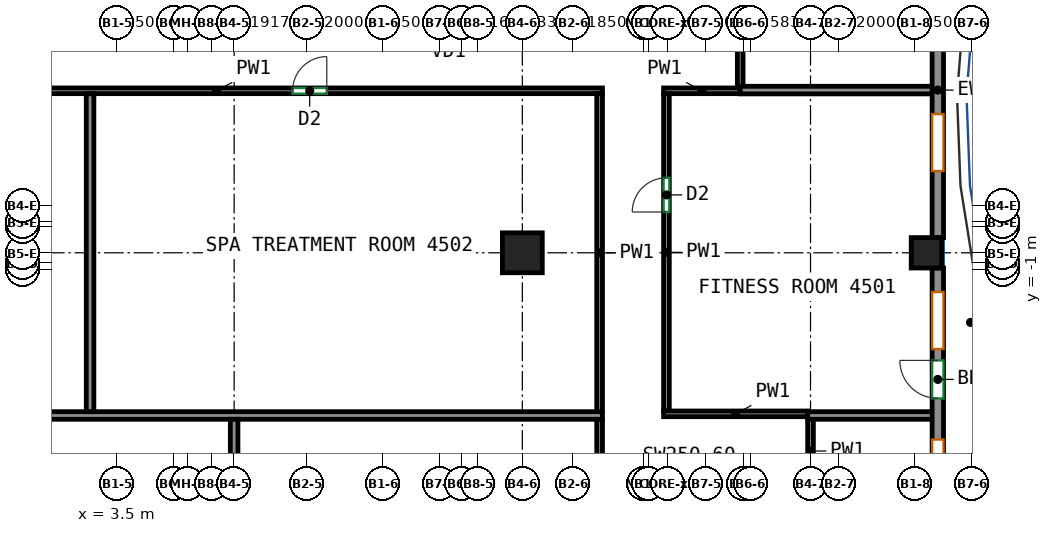
"""IFC4 building model, lengths in metres.
Left out: names, types, materials, properties, quantities, classifications, styles, units other than length and angle.
Written with IfcOpenShell. Run it as: python <this file> out.ifc"""

import sys

from ifc_helpers import new_model, si_unit, direction, frame, frame_2d, origin, origin_2d, place, context, subcontext, project, spatial, rectangle, extrude, source, transform, mapped, element, fill, save


model = new_model("IFC4")
c1 = context("Model", 3, precision=1e-05, world=origin(), true_north=direction((0.0, 1.0)))
c2 = subcontext(c1, "Body", "Model", "MODEL_VIEW")
j1 = project(units=[si_unit("LENGTHUNIT", "METRE"), si_unit("PLANEANGLEUNIT", "RADIAN")], contexts=[c1])
p1 = place(None, origin())
s1 = spatial("IfcSite", under=j1, at=p1, CompositionType="ELEMENT")
p2 = place(p1, origin())
s2 = spatial("IfcBuilding", under=s1, at=p2, CompositionType="ELEMENT")
p3 = place(p2, frame((0.0, 0.0, 188.9)))
s3 = spatial("IfcBuildingStorey", under=s2, at=p3, CompositionType="ELEMENT", Elevation=188.9)
m1 = source(origin(), c2, "Body", "SweptSolid", [
    extrude(rectangle(XDim=1.05, YDim=1.05, at=origin_2d()), origin(), (0.0, 0.0, 1.0), 3.12),
])
p4 = place(p3, frame((14.167, -0.562, 0.0), z_axis=(0.0, 0.0, 1.0), x_axis=(1.0, 0.0, 0.0)))
e1 = element("IfcColumn", 1, at=p4, inside=s3, PredefinedType="COLUMN", context=c2, shape_type="MappedRepresentation", body=[
    mapped(m1, transform((0.0, 0.0, 0.0))),
])
m2 = source(origin(), c2, "Body", "SweptSolid", [
    extrude(rectangle(XDim=0.8, YDim=0.8, at=origin_2d()), origin(), (0.0, 0.0, 1.0), 3.12),
])
p5 = place(p3, frame((24.8, -0.562, 0.0), z_axis=(0.0, 0.0, 1.0), x_axis=(1.0, 0.0, 0.0)))
e2 = element("IfcColumn", 2, at=p5, inside=s3, PredefinedType="COLUMN", context=c2, shape_type="MappedRepresentation", body=[
    mapped(m2, transform((0.0, 0.0, 0.0))),
])
m3 = source(origin(), c2, "Body", "SweptSolid", [
    extrude(rectangle(XDim=7.763, YDim=0.3, at=frame_2d((3.881, 0.0))), origin(), (0.0, 0.0, 1.0), 3.12),
])
p6 = place(p3, frame((25.1, -8.725, 0.0), z_axis=(0.0, 0.0, 1.0), x_axis=(0.0, 1.0, 0.0)))
e3 = element("IfcWall", 3, at=p6, inside=s3, PredefinedType="SOLIDWALL", context=c2, shape_type="MappedRepresentation", body=[
    mapped(m3, transform((0.0, 0.0, 0.0))),
])
p7 = place(p6, frame((1.75, 0.0, 0.85)))
e4 = element("IfcOpeningElement", 4, at=p7, cuts=e3, PredefinedType="OPENING", context=c2, shape_type="SweptSolid", body=[
    extrude(rectangle(XDim=1.5, YDim=1.95, at=frame_2d((0.75, 0.975))), frame((0.0, 0.16, 0.0), z_axis=(0.0, -1.0, 0.0), x_axis=(1.0, 0.0, 0.0)), (0.0, 0.0, 1.0), 0.32),
])
p8 = place(p6, frame((0.45, 0.0, 0.0)))
e5 = element("IfcOpeningElement", 5, at=p8, cuts=e3, PredefinedType="OPENING", context=c2, shape_type="SweptSolid", body=[
    extrude(rectangle(XDim=1.0, YDim=2.1, at=frame_2d((0.5, 1.05))), frame((0.0, 0.16, 0.0), z_axis=(0.0, -1.0, 0.0), x_axis=(1.0, 0.0, 0.0)), (0.0, 0.0, 1.0), 0.32),
])
p9 = place(p6, frame((5.631, 0.0, 0.85)))
e6 = element("IfcOpeningElement", 6, at=p9, cuts=e3, PredefinedType="OPENING", context=c2, shape_type="SweptSolid", body=[
    extrude(rectangle(XDim=1.5, YDim=1.95, at=frame_2d((0.75, 0.975))), frame((0.0, 0.16, 0.0), z_axis=(0.0, -1.0, 0.0), x_axis=(1.0, 0.0, 0.0)), (0.0, 0.0, 1.0), 0.32),
])
p10 = place(p6, frame((4.331, 0.0, 0.0)))
e7 = element("IfcOpeningElement", 7, at=p10, cuts=e3, PredefinedType="OPENING", context=c2, shape_type="SweptSolid", body=[
    extrude(rectangle(XDim=1.0, YDim=2.1, at=frame_2d((0.5, 1.05))), frame((0.0, 0.16, 0.0), z_axis=(0.0, -1.0, 0.0), x_axis=(1.0, 0.0, 0.0)), (0.0, 0.0, 1.0), 0.32),
])
p11 = place(p3, frame((25.1, -0.163, 0.0), z_axis=(0.0, 0.0, 1.0), x_axis=(0.0, 1.0, 0.0)))
e8 = element("IfcWall", 8, at=p11, inside=s3, PredefinedType="SOLIDWALL", context=c2, shape_type="MappedRepresentation", body=[
    mapped(m3, transform((0.0, 0.0, 0.0))),
])
p12 = place(p11, frame((1.75, 0.0, 0.85)))
e9 = element("IfcOpeningElement", 9, at=p12, cuts=e8, PredefinedType="OPENING", context=c2, shape_type="SweptSolid", body=[
    extrude(rectangle(XDim=1.5, YDim=1.95, at=frame_2d((0.75, 0.975))), frame((0.0, 0.16, 0.0), z_axis=(0.0, -1.0, 0.0), x_axis=(1.0, 0.0, 0.0)), (0.0, 0.0, 1.0), 0.32),
])
p13 = place(p11, frame((5.631, 0.0, 0.85)))
e10 = element("IfcOpeningElement", 10, at=p13, cuts=e8, PredefinedType="OPENING", context=c2, shape_type="SweptSolid", body=[
    extrude(rectangle(XDim=1.5, YDim=1.95, at=frame_2d((0.75, 0.975))), frame((0.0, 0.16, 0.0), z_axis=(0.0, -1.0, 0.0), x_axis=(1.0, 0.0, 0.0)), (0.0, 0.0, 1.0), 0.32),
])
p14 = place(p3, frame((19.9, 3.809, 0.0), z_axis=(0.0, 0.0, 1.0), x_axis=(0.0, 1.0, 0.0)))
e11 = element("IfcWall", 11, at=p14, inside=s3, PredefinedType="PARTITIONING", context=c2, shape_type="SweptSolid", body=[
    extrude(rectangle(XDim=4.101, YDim=0.15, at=frame_2d((2.05, 0.0))), origin(), (0.0, 0.0, 1.0), 3.12),
])
p15 = place(p14, frame((1.1, 0.0, 0.0)))
e12 = element("IfcOpeningElement", 12, at=p15, cuts=e11, PredefinedType="OPENING", context=c2, shape_type="SweptSolid", body=[
    extrude(rectangle(XDim=0.9, YDim=2.1, at=frame_2d((0.45, 1.05))), frame((0.0, 0.085, 0.0), z_axis=(0.0, -1.0, 0.0), x_axis=(1.0, 0.0, 0.0)), (0.0, 0.0, 1.0), 0.17),
])
p16 = place(p3, frame((17.884, 3.7, 0.0), z_axis=(0.0, 0.0, 1.0), x_axis=(1.0, 0.0, 0.0)))
e13 = element("IfcWall", 13, at=p16, inside=s3, PredefinedType="PARTITIONING", context=c2, shape_type="SweptSolid", body=[
    extrude(rectangle(XDim=2.016, YDim=0.15, at=frame_2d((1.008, 0.0))), origin(), (0.0, 0.0, 1.0), 3.12),
])
p17 = place(p3, frame((17.959, -4.725, 0.0), z_axis=(0.0, 0.0, 1.0), x_axis=(0.0, 1.0, 0.0)))
e14 = element("IfcWall", 14, at=p17, inside=s3, PredefinedType="PARTITIONING", context=c2, shape_type="SweptSolid", body=[
    extrude(rectangle(XDim=8.35, YDim=0.15, at=frame_2d((4.175, 0.0))), origin(), (0.0, 0.0, 1.0), 3.12),
])
p18 = place(p17, frame((5.236, 0.0, 0.0)))
e15 = element("IfcOpeningElement", 15, at=p18, cuts=e14, PredefinedType="OPENING", context=c2, shape_type="SweptSolid", body=[
    extrude(rectangle(XDim=0.9, YDim=2.1, at=frame_2d((0.45, 1.05))), frame((0.0, 0.085, 0.0), z_axis=(0.0, -1.0, 0.0), x_axis=(1.0, 0.0, 0.0)), (0.0, 0.0, 1.0), 0.17),
])
p19 = place(p3, frame((17.884, -4.8, 0.0), z_axis=(0.0, 0.0, 1.0), x_axis=(1.0, 0.0, 0.0)))
e16 = element("IfcWall", 16, at=p19, inside=s3, PredefinedType="PARTITIONING", context=c2, shape_type="SweptSolid", body=[
    extrude(rectangle(XDim=3.793, YDim=0.15, at=frame_2d((1.896, 0.0))), origin(), (0.0, 0.0, 1.0), 3.12),
])
p20 = place(p3, frame((21.75, -7.75, 0.0), z_axis=(0.0, 0.0, 1.0), x_axis=(0.0, 1.0, 0.0)))
e17 = element("IfcWall", 17, at=p20, inside=s3, PredefinedType="PARTITIONING", context=c2, shape_type="SweptSolid", body=[
    extrude(rectangle(XDim=2.817, YDim=0.15, at=frame_2d((1.408, 0.0))), origin(), (0.0, 0.0, 1.0), 3.12),
])
p21 = place(p20, frame((0.504, 0.0, 0.0)))
e18 = element("IfcOpeningElement", 18, at=p21, cuts=e17, PredefinedType="OPENING", context=c2, shape_type="SweptSolid", body=[
    extrude(rectangle(XDim=1.0, YDim=2.1, at=frame_2d((0.5, 1.05))), frame((0.0, 0.085, 0.0), z_axis=(0.0, -1.0, 0.0), x_axis=(1.0, 0.0, 0.0)), (0.0, 0.0, 1.0), 0.17),
])
p22 = place(p3, frame((-17.575, 3.7, 0.0), z_axis=(0.0, 0.0, 1.0), x_axis=(1.0, 0.0, 0.0)))
e19 = element("IfcWall", 19, at=p22, inside=s3, PredefinedType="PARTITIONING", context=c2, shape_type="SweptSolid", body=[
    extrude(rectangle(XDim=33.85, YDim=0.15, at=frame_2d((16.925, 0.0))), origin(), (0.0, 0.0, 1.0), 3.12),
])
p23 = place(p22, frame((10.584, 0.0, 0.0)))
e20 = element("IfcOpeningElement", 20, at=p23, cuts=e19, PredefinedType="OPENING", context=c2, shape_type="SweptSolid", body=[
    extrude(rectangle(XDim=0.9, YDim=2.1, at=frame_2d((0.45, 1.05))), frame((0.0, 0.085, 0.0), z_axis=(0.0, -1.0, 0.0), x_axis=(1.0, 0.0, 0.0)), (0.0, 0.0, 1.0), 0.17),
])
p24 = place(p22, frame((16.175, 0.0, 0.0)))
e21 = element("IfcOpeningElement", 21, at=p24, cuts=e19, PredefinedType="OPENING", context=c2, shape_type="SweptSolid", body=[
    extrude(rectangle(XDim=0.9, YDim=2.1, at=frame_2d((0.45, 1.05))), frame((0.0, 0.085, 0.0), z_axis=(0.0, -1.0, 0.0), x_axis=(1.0, 0.0, 0.0)), (0.0, 0.0, 1.0), 0.17),
])
p25 = place(p22, frame((25.696, 0.0, 0.0)))
e22 = element("IfcOpeningElement", 22, at=p25, cuts=e19, PredefinedType="OPENING", context=c2, shape_type="SweptSolid", body=[
    extrude(rectangle(XDim=0.9, YDim=2.1, at=frame_2d((0.45, 1.05))), frame((0.0, 0.085, 0.0), z_axis=(0.0, -1.0, 0.0), x_axis=(1.0, 0.0, 0.0)), (0.0, 0.0, 1.0), 0.17),
])
p26 = place(p3, frame((16.2, -4.753, 0.0), z_axis=(0.0, 0.0, 1.0), x_axis=(0.0, 1.0, 0.0)))
e23 = element("IfcWall", 23, at=p26, inside=s3, PredefinedType="PARTITIONING", context=c2, shape_type="SweptSolid", body=[
    extrude(rectangle(XDim=8.378, YDim=0.15, at=frame_2d((4.189, 0.0))), origin(), (0.0, 0.0, 1.0), 3.12),
])
p27 = place(p3, frame((16.2, -15.425, 0.0), z_axis=(0.0, 0.0, 1.0), x_axis=(0.0, 1.0, 0.0)))
e24 = element("IfcWall", 24, at=p27, inside=s3, PredefinedType="PARTITIONING", context=c2, shape_type="SweptSolid", body=[
    extrude(rectangle(XDim=10.492, YDim=0.15, at=frame_2d((5.246, 0.0))), origin(), (0.0, 0.0, 1.0), 3.12),
])
p28 = place(p27, frame((0.402, 0.0, 0.0)))
e25 = element("IfcOpeningElement", 25, at=p28, cuts=e24, PredefinedType="OPENING", context=c2, shape_type="SweptSolid", body=[
    extrude(rectangle(XDim=0.9, YDim=2.1, at=frame_2d((0.45, 1.05))), frame((0.0, 0.085, 0.0), z_axis=(0.0, -1.0, 0.0), x_axis=(1.0, 0.0, 0.0)), (0.0, 0.0, 1.0), 0.17),
])
p29 = place(p3, frame((19.902, 3.719, 0.0), z_axis=(0.0, 0.0, 1.0), x_axis=(1.0, 0.0, 0.0)))
e26 = element("IfcWall", 26, at=p29, inside=s3, PredefinedType="PARTITIONING", context=c2, shape_type="SweptSolid", body=[
    extrude(rectangle(XDim=5.098, YDim=0.2, at=frame_2d((2.549, 0.0))), origin(), (0.0, 0.0, 1.0), 3.12),
])
p30 = place(p3, frame((21.677, -4.843, 0.0), z_axis=(0.0, 0.0, 1.0), x_axis=(1.0, 0.0, 0.0)))
e27 = element("IfcWall", 27, at=p30, inside=s3, PredefinedType="PARTITIONING", context=c2, shape_type="SweptSolid", body=[
    extrude(rectangle(XDim=3.323, YDim=0.2, at=frame_2d((1.662, 0.0))), origin(), (0.0, 0.0, 1.0), 3.12),
])
p31 = place(p3, frame((-13.873, -4.843, 0.0), z_axis=(0.0, 0.0, 1.0), x_axis=(1.0, 0.0, 0.0)))
e28 = element("IfcWall", 28, at=p31, inside=s3, PredefinedType="PARTITIONING", context=c2, shape_type="SweptSolid", body=[
    extrude(rectangle(XDim=30.146, YDim=0.2, at=frame_2d((15.073, 0.0))), origin(), (0.0, 0.0, 1.0), 3.12),
])
p32 = place(p3, frame((2.792, -4.743, 0.0), z_axis=(0.0, 0.0, 1.0), x_axis=(0.0, 1.0, 0.0)))
e29 = element("IfcWall", 29, at=p32, inside=s3, PredefinedType="PARTITIONING", context=c2, shape_type="SweptSolid", body=[
    extrude(rectangle(XDim=8.366, YDim=0.2, at=frame_2d((4.183, 0.0))), origin(), (0.0, 0.0, 1.0), 3.12),
])
p33 = place(p3, frame((6.583, -15.423, 0.0), z_axis=(0.0, 0.0, 1.0), x_axis=(0.0, 1.0, 0.0)))
e30 = element("IfcWall", 30, at=p33, inside=s3, PredefinedType="PARTITIONING", context=c2, shape_type="SweptSolid", body=[
    extrude(rectangle(XDim=10.48, YDim=0.2, at=frame_2d((5.24, 0.0))), origin(), (0.0, 0.0, 1.0), 3.12),
])
p34 = place(p7, origin())
e31 = element("IfcWindow", 31, at=p34, inside=s3, PartitioningType="SINGLE_PANEL", PredefinedType="WINDOW", context=c2, shape_type="SweptSolid", body=[
    extrude(rectangle(XDim=1.5, YDim=1.95, at=frame_2d((0.75, 0.975))), frame((0.0, 0.03, 0.0), z_axis=(0.0, -1.0, 0.0), x_axis=(1.0, 0.0, 0.0)), (0.0, 0.0, 1.0), 0.06),
])
fill(e4, e31)
p35 = place(p9, origin())
e32 = element("IfcWindow", 32, at=p35, inside=s3, PartitioningType="SINGLE_PANEL", PredefinedType="WINDOW", context=c2, shape_type="SweptSolid", body=[
    extrude(rectangle(XDim=1.5, YDim=1.95, at=frame_2d((0.75, 0.975))), frame((0.0, 0.03, 0.0), z_axis=(0.0, -1.0, 0.0), x_axis=(1.0, 0.0, 0.0)), (0.0, 0.0, 1.0), 0.06),
])
fill(e6, e32)
p36 = place(p10, origin())
e33 = element("IfcDoor", 33, at=p36, inside=s3, OperationType="SINGLE_SWING_RIGHT", PredefinedType="DOOR", context=c2, shape_type="SweptSolid", body=[
    extrude(rectangle(XDim=1.0, YDim=2.1, at=frame_2d((0.5, 1.05))), frame((0.0, 0.025, 0.0), z_axis=(0.0, -1.0, 0.0), x_axis=(1.0, 0.0, 0.0)), (0.0, 0.0, 1.0), 0.05),
])
fill(e7, e33)
p37 = place(p12, origin())
e34 = element("IfcWindow", 34, at=p37, inside=s3, PartitioningType="SINGLE_PANEL", PredefinedType="WINDOW", context=c2, shape_type="SweptSolid", body=[
    extrude(rectangle(XDim=1.5, YDim=1.95, at=frame_2d((0.75, 0.975))), frame((0.0, 0.03, 0.0), z_axis=(0.0, -1.0, 0.0), x_axis=(1.0, 0.0, 0.0)), (0.0, 0.0, 1.0), 0.06),
])
fill(e9, e34)
p38 = place(p18, origin())
e35 = element("IfcDoor", 35, at=p38, inside=s3, OperationType="SINGLE_SWING_LEFT", PredefinedType="DOOR", context=c2, shape_type="SweptSolid", body=[
    extrude(rectangle(XDim=0.9, YDim=2.1, at=frame_2d((0.45, 1.05))), frame((0.0, 0.025, 0.0), z_axis=(0.0, -1.0, 0.0), x_axis=(1.0, 0.0, 0.0)), (0.0, 0.0, 1.0), 0.05),
])
fill(e15, e35)
p39 = place(p25, origin())
e36 = element("IfcDoor", 36, at=p39, inside=s3, OperationType="SINGLE_SWING_RIGHT", PredefinedType="DOOR", context=c2, shape_type="SweptSolid", body=[
    extrude(rectangle(XDim=0.9, YDim=2.1, at=frame_2d((0.45, 1.05))), frame((0.0, 0.025, 0.0), z_axis=(0.0, -1.0, 0.0), x_axis=(1.0, 0.0, 0.0)), (0.0, 0.0, 1.0), 0.05),
])
fill(e22, e36)
save(model, sys.argv[1])
